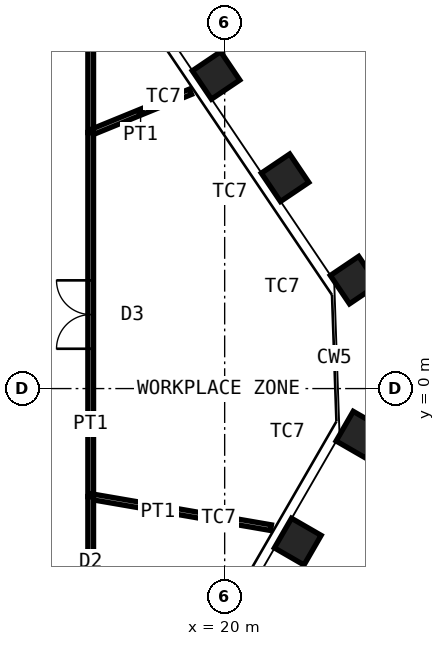
"""IFC4 building model, lengths in metres.
Left out: names, types, materials, properties, quantities, classifications, styles, units other than length and angle.
Written with IfcOpenShell. Run it as: python <this file> out.ifc"""

import sys

from ifc_helpers import new_model, si_unit, direction, frame, frame_2d, origin, origin_2d, place, context, subcontext, project, spatial, rectangle, hollow_rectangle, extrude, element, fill, save


model = new_model("IFC4")
c1 = context("Model", 3, precision=1e-05, world=origin(), true_north=direction((0.0, 1.0)))
c2 = subcontext(c1, "Body", "Model", "MODEL_VIEW")
j1 = project(units=[si_unit("LENGTHUNIT", "METRE"), si_unit("PLANEANGLEUNIT", "RADIAN")], contexts=[c1])
p1 = place(None, origin())
s1 = spatial("IfcSite", under=j1, at=p1, CompositionType="ELEMENT")
p2 = place(p1, origin())
s2 = spatial("IfcBuilding", under=s1, at=p2, CompositionType="ELEMENT")
p3 = place(p2, frame((0.0, 0.0, 270.4)))
s3 = spatial("IfcBuildingStorey", under=s2, at=p3, CompositionType="ELEMENT", Elevation=270.4)
for number, where, z_axis, x_axis in (
    (1, (19.773, 8.239, 0.0), (0.0, 0.0, 1.0), (-0.559, 0.829, 0.0)),
    (2, (21.589, 5.547, 0.0), (0.0, 0.0, 1.0), (-0.559, 0.829, 0.0)),
    (3, (23.406, 2.854, 0.0), (0.0, 0.0, 1.0), (-0.559, 0.829, 0.0)),
    (4, (23.548, -1.214, 0.0), (0.0, 0.0, 1.0), (0.5, 0.866, 0.0)),
    (5, (21.924, -4.027, 0.0), (0.0, 0.0, 1.0), (0.5, 0.866, 0.0)),
):
    element("IfcColumn", number, at=place(p3, frame(where, z_axis=z_axis, x_axis=x_axis)), inside=s3, PredefinedType="COLUMN", context=c2, shape_type="SweptSolid", body=[
        extrude(hollow_rectangle(XDim=0.9, YDim=0.9, WallThickness=0.06, at=origin_2d()), origin(), (0.0, 0.0, 1.0), 4.2),
    ])
p4 = place(p3, frame((16.475, 11.375, 0.0), z_axis=(0.0, 0.0, 1.0), x_axis=(0.0, -1.0, 0.0)))
e6 = element("IfcWall", 6, at=p4, inside=s3, PredefinedType="PARTITIONING", context=c2, shape_type="SweptSolid", body=[
    extrude(rectangle(XDim=4.638, YDim=0.15, at=frame_2d((2.319, 0.0))), origin(), (0.0, 0.0, 1.0), 4.03),
])
p5 = place(p3, frame((19.1, 7.81, 0.0), z_axis=(0.0, 0.0, 1.0), x_axis=(-0.925593572601, -0.378518874509, 0.0)))
e7 = element("IfcWall", 7, at=p5, inside=s3, PredefinedType="PARTITIONING", context=c2, shape_type="SweptSolid", body=[
    extrude(rectangle(XDim=2.836, YDim=0.15, at=frame_2d((1.418, 0.0))), origin(), (0.0, 0.0, 1.0), 3.33),
])
p6 = place(p3, frame((16.475, 6.737, 0.0), z_axis=(0.0, 0.0, 1.0), x_axis=(0.0, -1.0, 0.0)))
e8 = element("IfcWall", 8, at=p6, inside=s3, PredefinedType="PARTITIONING", context=c2, shape_type="SweptSolid", body=[
    extrude(rectangle(XDim=9.578, YDim=0.15, at=frame_2d((4.789, 0.0))), origin(), (0.0, 0.0, 1.0), 4.03),
])
p7 = place(p6, frame((3.889, 0.0, 0.0)))
e9 = element("IfcOpeningElement", 9, at=p7, cuts=e8, PredefinedType="OPENING", context=c2, shape_type="SweptSolid", body=[
    extrude(rectangle(XDim=1.8, YDim=2.4, at=frame_2d((0.9, 1.2))), frame((0.0, 0.085, 0.0), z_axis=(0.0, -1.0, 0.0), x_axis=(1.0, 0.0, 0.0)), (0.0, 0.0, 1.0), 0.17),
])
p8 = place(p3, frame((21.219, -3.66, 0.0), z_axis=(0.0, 0.0, 1.0), x_axis=(-0.985444592587, 0.16999692627, 0.0)))
e10 = element("IfcWall", 10, at=p8, inside=s3, PredefinedType="PARTITIONING", context=c2, shape_type="SweptSolid", body=[
    extrude(rectangle(XDim=4.814, YDim=0.15, at=frame_2d((2.407, 0.0))), origin(), (0.0, 0.0, 1.0), 4.03),
])
p9 = place(p3, frame((16.475, -2.842, 0.0), z_axis=(0.0, 0.0, 1.0), x_axis=(0.0, -1.0, 0.0)))
e11 = element("IfcWall", 11, at=p9, inside=s3, PredefinedType="PARTITIONING", context=c2, shape_type="SweptSolid", body=[
    extrude(rectangle(XDim=5.64, YDim=0.15, at=frame_2d((2.82, 0.0))), origin(), (0.0, 0.0, 1.0), 4.03),
])
p10 = place(p9, frame((2.32, 0.0, 0.0)))
e12 = element("IfcOpeningElement", 12, at=p10, cuts=e11, PredefinedType="OPENING", context=c2, shape_type="SweptSolid", body=[
    extrude(rectangle(XDim=1.0, YDim=2.4, at=frame_2d((0.5, 1.2))), frame((0.0, 0.085, 0.0), z_axis=(0.0, -1.0, 0.0), x_axis=(1.0, 0.0, 0.0)), (0.0, 0.0, 1.0), 0.17),
])
p11 = place(p7, origin())
e13 = element("IfcDoor", 13, at=p11, inside=s3, OperationType="DOUBLE_DOOR_DOUBLE_SWING", PredefinedType="DOOR", context=c2, shape_type="SweptSolid", body=[
    extrude(rectangle(XDim=1.8, YDim=2.4, at=frame_2d((0.9, 1.2))), frame((0.0, 0.025, 0.0), z_axis=(0.0, -1.0, 0.0), x_axis=(1.0, 0.0, 0.0)), (0.0, 0.0, 1.0), 0.05),
])
fill(e9, e13)
save(model, sys.argv[1])
